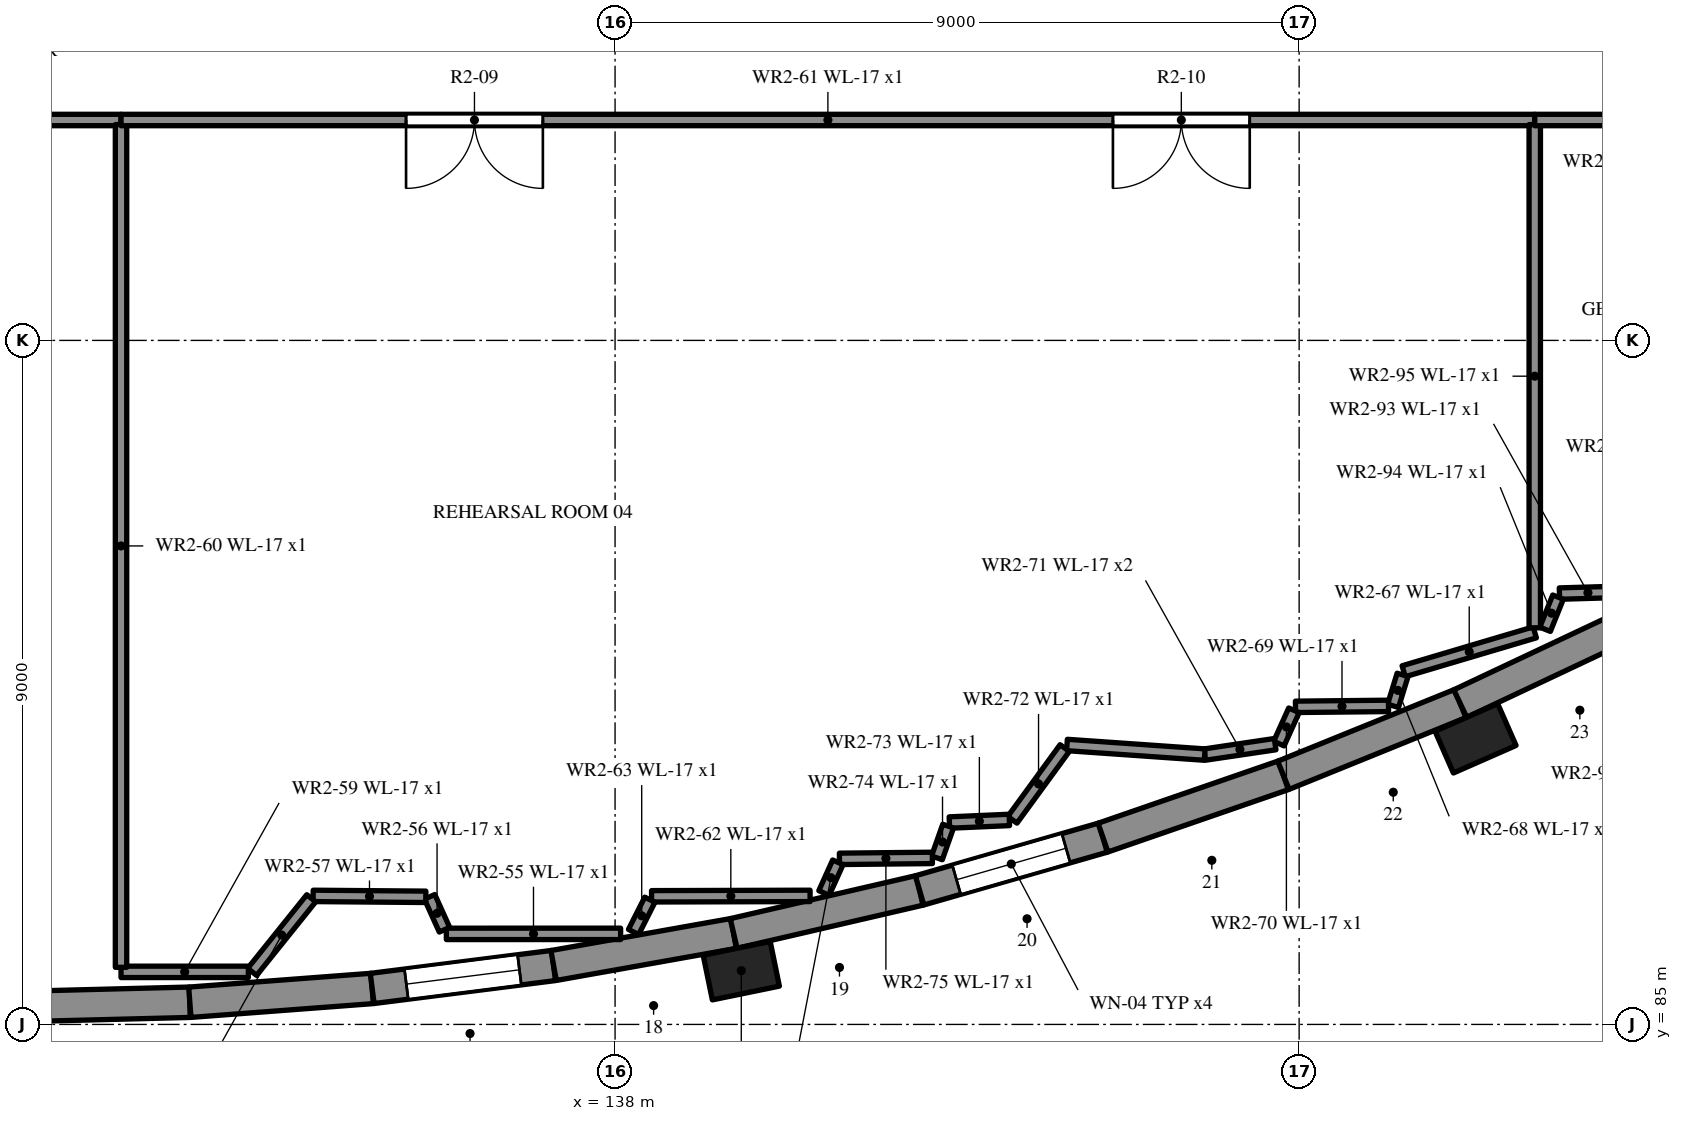
"""IFC4 building model, lengths in metres.
Left out: names, types, materials, properties, quantities, classifications, styles, units other than length and angle.
Written with IfcOpenShell. Run it as: python <this file> out.ifc"""

import sys

from ifc_helpers import new_model, si_unit, direction, frame, frame_2d, origin, origin_2d, place, context, subcontext, project, spatial, polyline, rectangle, outline, extrude, element, fill, save


model = new_model("IFC4")
c1 = context("Model", 3, precision=1e-05, world=origin(), true_north=direction((0.0, 1.0)))
c2 = subcontext(c1, "Body", "Model", "MODEL_VIEW")
j1 = project(units=[si_unit("LENGTHUNIT", "METRE"), si_unit("PLANEANGLEUNIT", "RADIAN")], contexts=[c1])
p1 = place(None, origin())
s1 = spatial("IfcSite", under=j1, at=p1, CompositionType="ELEMENT")
p2 = place(p1, origin())
s2 = spatial("IfcBuilding", under=s1, at=p2, CompositionType="ELEMENT")
p3 = place(p2, frame((0.0, 0.0, 10.2)))
s3 = spatial("IfcBuildingStorey", under=s2, at=p3, CompositionType="ELEMENT", Elevation=10.2)
p4 = place(p3, frame((130.0, 85.231, 0.0), z_axis=(0.0, 0.0, 1.0), x_axis=(0.999683321759, 0.025164582196, 0.0)))
e1 = element("IfcWall", 1, at=p4, inside=s3, PredefinedType="SOLIDWALL", context=c2, shape_type="SweptSolid", body=[
    extrude(outline(polyline([(0.0, 0.0), (2.406, 0.0), (2.406, 2.959), (2.373, 2.971), (0.063, 3.835), (0.0, 3.859), (0.0, 0.0)])), frame((0.0, 0.2, 0.0), z_axis=(0.0, -1.0, 0.0), x_axis=(1.0, 0.0, 0.0)), (0.0, 0.0, 1.0), 0.4),
])
p5 = place(p3, frame((132.405, 85.292, 0.0), z_axis=(0.0, 0.0, 1.0), x_axis=(0.997146276918, 0.075493724435, 0.0)))
e2 = element("IfcWall", 2, at=p5, inside=s3, PredefinedType="SOLIDWALL", context=c2, shape_type="SweptSolid", body=[
    extrude(outline(polyline([(0.0, 0.0), (2.406, 0.0), (2.406, 2.054), (2.345, 2.077), (0.0, 2.955), (0.0, 0.0)])), frame((0.0, 0.2, 0.0), z_axis=(0.0, -1.0, 0.0), x_axis=(1.0, 0.0, 0.0)), (0.0, 0.0, 1.0), 0.4),
])
p6 = place(p3, frame((134.804, 85.473, 0.0), z_axis=(0.0, 0.0, 1.0), x_axis=(0.99208939311, 0.125533406227, 0.0)))
e3 = element("IfcWall", 3, at=p6, inside=s3, PredefinedType="SOLIDWALL", context=c2, shape_type="SweptSolid", body=[
    extrude(outline(polyline([(0.0, 0.0), (2.406, 0.0), (2.406, 2.955), (2.34, 2.931), (0.108, 2.096), (0.0, 2.056), (0.0, 0.0)])), frame((0.0, 0.2, 0.0), z_axis=(0.0, -1.0, 0.0), x_axis=(1.0, 0.0, 0.0)), (0.0, 0.0, 1.0), 0.4),
])
p7 = place(p6, frame((0.453, 0.0, 0.9)))
e4 = element("IfcOpeningElement", 4, at=p7, cuts=e3, PredefinedType="OPENING", context=c2, shape_type="SweptSolid", body=[
    extrude(rectangle(XDim=1.5, YDim=0.9, at=frame_2d((0.75, 0.45))), frame((0.0, 0.21, 0.0), z_axis=(0.0, -1.0, 0.0), x_axis=(1.0, 0.0, 0.0)), (0.0, 0.0, 1.0), 0.42),
])
p8 = place(p3, frame((137.191, 85.775, 0.0), z_axis=(0.0, 0.0, 1.0), x_axis=(0.984524011381, 0.175249738987, 0.0)))
e5 = element("IfcWall", 5, at=p8, inside=s3, PredefinedType="SOLIDWALL", context=c2, shape_type="SweptSolid", body=[
    extrude(outline(polyline([(0.0, 0.0), (2.406, 0.0), (2.406, 3.817), (2.356, 3.84), (2.285, 3.814), (0.078, 2.988), (0.0, 2.959), (0.0, 0.0)])), frame((0.0, 0.2, 0.0), z_axis=(0.0, -1.0, 0.0), x_axis=(1.0, 0.0, 0.0)), (0.0, 0.0, 1.0), 0.4),
])
p9 = place(p3, frame((139.56, 86.197, 0.0), z_axis=(0.0, 0.0, 1.0), x_axis=(0.974210649093, 0.225640446716, 0.0)))
e6 = element("IfcWall", 6, at=p9, inside=s3, PredefinedType="SOLIDWALL", context=c2, shape_type="SweptSolid", body=[
    extrude(outline(polyline([(0.0, 0.0), (2.511, 0.0), (2.511, 2.911), (0.086, 3.783), (0.0, 3.813), (0.0, 0.0)])), frame((0.0, 0.2, 0.0), z_axis=(0.0, -1.0, 0.0), x_axis=(1.0, 0.0, 0.0)), (0.0, 0.0, 1.0), 0.4),
])
p10 = place(p3, frame((142.006, 86.764, 0.0), z_axis=(0.0, 0.0, 1.0), x_axis=(0.961008605775, 0.276518461637, 0.0)))
e7 = element("IfcWall", 7, at=p10, inside=s3, PredefinedType="SOLIDWALL", context=c2, shape_type="SweptSolid", body=[
    extrude(outline(polyline([(0.0, 0.0), (2.511, 0.0), (2.511, 2.007), (2.479, 2.019), (0.0, 2.907), (0.0, 0.0)])), frame((0.0, 0.2, 0.0), z_axis=(0.0, -1.0, 0.0), x_axis=(1.0, 0.0, 0.0)), (0.0, 0.0, 1.0), 0.4),
])
p11 = place(p10, frame((0.506, 0.0, 0.9)))
e8 = element("IfcOpeningElement", 8, at=p11, cuts=e7, PredefinedType="OPENING", context=c2, shape_type="SweptSolid", body=[
    extrude(rectangle(XDim=1.5, YDim=0.9, at=frame_2d((0.75, 0.45))), frame((0.0, 0.21, 0.0), z_axis=(0.0, -1.0, 0.0), x_axis=(1.0, 0.0, 0.0)), (0.0, 0.0, 1.0), 0.42),
])
p12 = place(p3, frame((144.419, 87.458, 0.0), z_axis=(0.0, 0.0, 1.0), x_axis=(0.94514546406, 0.326649738659, 0.0)))
e9 = element("IfcWall", 9, at=p12, inside=s3, PredefinedType="SOLIDWALL", context=c2, shape_type="SweptSolid", body=[
    extrude(outline(polyline([(0.0, 0.0), (2.511, 0.0), (2.511, 2.892), (2.382, 2.852), (0.19, 2.066), (0.0, 2.004), (0.0, 0.0)])), frame((0.0, 0.2, 0.0), z_axis=(0.0, -1.0, 0.0), x_axis=(1.0, 0.0, 0.0)), (0.0, 0.0, 1.0), 0.4),
])
p13 = place(p3, frame((146.793, 88.278, 0.0), z_axis=(0.0, 0.0, 1.0), x_axis=(0.926722795862, 0.375745738007, 0.0)))
e10 = element("IfcWall", 10, at=p13, inside=s3, PredefinedType="SOLIDWALL", context=c2, shape_type="SweptSolid", body=[
    extrude(outline(polyline([(0.0, 0.0), (2.511, 0.0), (2.511, 3.696), (2.479, 3.708), (2.398, 3.755), (2.317, 3.726), (0.144, 2.947), (0.0, 2.896), (0.0, 0.0)])), frame((0.0, 0.2, 0.0), z_axis=(0.0, -1.0, 0.0), x_axis=(1.0, 0.0, 0.0)), (0.0, 0.0, 1.0), 0.4),
])
p14 = place(p3, frame((149.12, 89.222, 0.0), z_axis=(0.0, 0.0, 1.0), x_axis=(0.904527098751, 0.42641614372, 0.0)))
e11 = element("IfcWall", 11, at=p14, inside=s3, PredefinedType="SOLIDWALL", context=c2, shape_type="SweptSolid", body=[
    extrude(outline(polyline([(0.0, 0.0), (2.772, 0.0), (2.772, 2.787), (2.749, 2.796), (0.21, 3.624), (0.116, 3.655), (0.0, 3.692), (0.0, 0.0)])), frame((0.0, 0.2, 0.0), z_axis=(0.0, -1.0, 0.0), x_axis=(1.0, 0.0, 0.0)), (0.0, 0.0, 1.0), 0.4),
])
p15 = place(p3, frame((139.66, 85.707, 0.0), z_axis=(0.0, 0.0, 1.0), x_axis=(0.979575047818, 0.201078904144, 0.0)))
e12 = element("IfcColumn", 12, at=p15, inside=s3, PredefinedType="PILASTER", context=c2, shape_type="SweptSolid", body=[
    extrude(rectangle(XDim=0.9, YDim=0.6, at=origin_2d()), origin(), (0.0, 0.0, 1.0), 3.247),
])
p16 = place(p3, frame((149.321, 88.764, 0.0), z_axis=(0.0, 0.0, 1.0), x_axis=(0.915419314521, 0.402501526211, 0.0)))
e13 = element("IfcColumn", 13, at=p16, inside=s3, PredefinedType="PILASTER", context=c2, shape_type="SweptSolid", body=[
    extrude(rectangle(XDim=0.9, YDim=0.6, at=origin_2d()), origin(), (0.0, 0.0, 1.0), 2.91),
])
p17 = place(p3, frame((131.5, 96.9, 0.0), z_axis=(0.0, 0.0, 1.0), x_axis=(-1.0, 0.0, 0.0)))
e14 = element("IfcWall", 14, at=p17, inside=s3, PredefinedType="PARTITIONING", context=c2, shape_type="SweptSolid", body=[
    extrude(rectangle(XDim=21.6, YDim=0.15, at=frame_2d((10.8, 0.0))), origin(), (0.0, 0.0, 1.0), 2.5),
])
p18 = place(p3, frame((138.073, 86.192, 0.0), z_axis=(0.0, 0.0, 1.0), x_axis=(-0.99999999433, -0.000106484932, 0.0)))
e15 = element("IfcWall", 15, at=p18, inside=s3, PredefinedType="PARTITIONING", context=c2, shape_type="SweptSolid", body=[
    extrude(rectangle(XDim=2.293, YDim=0.15, at=frame_2d((1.146, 0.0))), origin(), (0.0, 0.0, 1.0), 2.5),
])
p19 = place(p3, frame((135.756, 86.246, 0.0), z_axis=(0.0, 0.0, 1.0), x_axis=(-0.411669446009, 0.911333236101, 0.0)))
e16 = element("IfcWall", 16, at=p19, inside=s3, PredefinedType="PARTITIONING", context=c2, shape_type="SweptSolid", body=[
    extrude(rectangle(XDim=0.474, YDim=0.15, at=frame_2d((0.237, 0.0))), origin(), (0.0, 0.0, 1.0), 2.5),
])
p20 = place(p3, frame((135.51, 86.679, 0.0), z_axis=(0.0, 0.0, 1.0), x_axis=(-0.999966098072, 0.008234239938, 0.0)))
e17 = element("IfcWall", 17, at=p20, inside=s3, PredefinedType="PARTITIONING", context=c2, shape_type="SweptSolid", body=[
    extrude(rectangle(XDim=1.482, YDim=0.15, at=frame_2d((0.741, 0.0))), origin(), (0.0, 0.0, 1.0), 2.5),
])
p21 = place(p3, frame((134.003, 86.66, 0.0), z_axis=(0.0, 0.0, 1.0), x_axis=(-0.626036892137, -0.779793440395, 0.0)))
e18 = element("IfcWall", 18, at=p21, inside=s3, PredefinedType="PARTITIONING", context=c2, shape_type="SweptSolid", body=[
    extrude(rectangle(XDim=1.242, YDim=0.15, at=frame_2d((0.621, 0.0))), origin(), (0.0, 0.0, 1.0), 2.5),
])
p22 = place(p3, frame((133.175, 85.692, 0.0), z_axis=(0.0, 0.0, 1.0), x_axis=(-1.0, 0.0, 0.0)))
e19 = element("IfcWall", 19, at=p22, inside=s3, PredefinedType="PARTITIONING", context=c2, shape_type="SweptSolid", body=[
    extrude(rectangle(XDim=1.675, YDim=0.15, at=frame_2d((0.838, 0.0))), origin(), (0.0, 0.0, 1.0), 2.5),
])
p23 = place(p3, frame((131.5, 96.84, 0.0), z_axis=(0.0, 0.0, 1.0), x_axis=(0.0, -1.0, 0.0)))
e20 = element("IfcWall", 20, at=p23, inside=s3, PredefinedType="PARTITIONING", context=c2, shape_type="SweptSolid", body=[
    extrude(rectangle(XDim=11.089, YDim=0.15, at=frame_2d((5.544, 0.0))), origin(), (0.0, 0.0, 1.0), 2.5),
])
p24 = place(p3, frame((150.1, 96.9, 0.0), z_axis=(0.0, 0.0, 1.0), x_axis=(-1.0, 0.0, 0.0)))
e21 = element("IfcWall", 21, at=p24, inside=s3, PredefinedType="PARTITIONING", context=c2, shape_type="SweptSolid", body=[
    extrude(rectangle(XDim=18.6, YDim=0.15, at=frame_2d((9.3, 0.0))), origin(), (0.0, 0.0, 1.0), 2.5),
])
p25 = place(p24, frame((13.05, 0.0, 0.0)))
e22 = element("IfcOpeningElement", 22, at=p25, cuts=e21, PredefinedType="OPENING", context=c2, shape_type="SweptSolid", body=[
    extrude(rectangle(XDim=1.8, YDim=2.1, at=frame_2d((0.9, 1.05))), frame((0.0, 0.085, 0.0), z_axis=(0.0, -1.0, 0.0), x_axis=(1.0, 0.0, 0.0)), (0.0, 0.0, 1.0), 0.17),
])
p26 = place(p24, frame((3.75, 0.0, 0.0)))
e23 = element("IfcOpeningElement", 23, at=p26, cuts=e21, PredefinedType="OPENING", context=c2, shape_type="SweptSolid", body=[
    extrude(rectangle(XDim=1.8, YDim=2.1, at=frame_2d((0.9, 1.05))), frame((0.0, 0.085, 0.0), z_axis=(0.0, -1.0, 0.0), x_axis=(1.0, 0.0, 0.0)), (0.0, 0.0, 1.0), 0.17),
])
p27 = place(p3, frame((140.566, 86.691, 0.0), z_axis=(0.0, 0.0, 1.0), x_axis=(-0.999996683393, -0.002575500706, 0.0)))
e24 = element("IfcWall", 24, at=p27, inside=s3, PredefinedType="PARTITIONING", context=c2, shape_type="SweptSolid", body=[
    extrude(rectangle(XDim=2.085, YDim=0.15, at=frame_2d((1.043, 0.0))), origin(), (0.0, 0.0, 1.0), 2.5),
])
p28 = place(p3, frame((138.458, 86.641, 0.0), z_axis=(0.0, 0.0, 1.0), x_axis=(-0.45070081115, -0.892675069008, 0.0)))
e25 = element("IfcWall", 25, at=p28, inside=s3, PredefinedType="PARTITIONING", context=c2, shape_type="SweptSolid", body=[
    extrude(rectangle(XDim=0.476, YDim=0.15, at=frame_2d((0.238, 0.0))), origin(), (0.0, 0.0, 1.0), 2.5),
])
p29 = place(p3, frame((150.1, 90.158, 0.0), z_axis=(0.0, 0.0, 1.0), x_axis=(-0.958762505139, -0.284208477599, 0.0)))
e26 = element("IfcWall", 26, at=p29, inside=s3, PredefinedType="PARTITIONING", context=c2, shape_type="SweptSolid", body=[
    extrude(rectangle(XDim=1.799, YDim=0.15, at=frame_2d((0.899, 0.0))), origin(), (0.0, 0.0, 1.0), 2.5),
])
p30 = place(p3, frame((148.361, 89.599, 0.0), z_axis=(0.0, 0.0, 1.0), x_axis=(-0.293804120927, -0.955865648785, 0.0)))
e27 = element("IfcWall", 27, at=p30, inside=s3, PredefinedType="PARTITIONING", context=c2, shape_type="SweptSolid", body=[
    extrude(rectangle(XDim=0.426, YDim=0.15, at=frame_2d((0.213, 0.0))), origin(), (0.0, 0.0, 1.0), 2.5),
])
p31 = place(p3, frame((148.176, 89.191, 0.0), z_axis=(0.0, 0.0, 1.0), x_axis=(-0.99994825347, -0.010173022327, 0.0)))
e28 = element("IfcWall", 28, at=p31, inside=s3, PredefinedType="PARTITIONING", context=c2, shape_type="SweptSolid", body=[
    extrude(rectangle(XDim=1.224, YDim=0.15, at=frame_2d((0.612, 0.0))), origin(), (0.0, 0.0, 1.0), 2.5),
])
p32 = place(p3, frame((146.931, 89.133, 0.0), z_axis=(0.0, 0.0, 1.0), x_axis=(-0.411926919876, -0.911216885643, 0.0)))
e29 = element("IfcWall", 29, at=p32, inside=s3, PredefinedType="PARTITIONING", context=c2, shape_type="SweptSolid", body=[
    extrude(rectangle(XDim=0.481, YDim=0.15, at=frame_2d((0.24, 0.0))), origin(), (0.0, 0.0, 1.0), 2.5),
])
p33 = place(p3, frame((146.684, 88.688, 0.0), z_axis=(0.0, 0.0, 1.0), x_axis=(-0.989174053521, -0.1467470335, 0.0)))
e30 = element("IfcWall", 30, at=p33, inside=s3, PredefinedType="PARTITIONING", context=c2, shape_type="SweptSolid", body=[
    extrude(rectangle(XDim=0.937, YDim=0.15, at=frame_2d((0.468, 0.0))), origin(), (0.0, 0.0, 1.0), 2.5),
])
p34 = place(p3, frame((145.758, 88.55, 0.0), z_axis=(0.0, 0.0, 1.0), x_axis=(-0.997564674207, 0.069747550305, 0.0)))
e31 = element("IfcWall", 31, at=p34, inside=s3, PredefinedType="PARTITIONING", context=c2, shape_type="SweptSolid", body=[
    extrude(rectangle(XDim=1.817, YDim=0.15, at=frame_2d((0.908, 0.0))), origin(), (0.0, 0.0, 1.0), 2.5),
])
p35 = place(p3, frame((143.916, 88.636, 0.0), z_axis=(0.0, 0.0, 1.0), x_axis=(-0.589351162838, -0.807876975078, 0.0)))
e32 = element("IfcWall", 32, at=p35, inside=s3, PredefinedType="PARTITIONING", context=c2, shape_type="SweptSolid", body=[
    extrude(rectangle(XDim=1.169, YDim=0.15, at=frame_2d((0.584, 0.0))), origin(), (0.0, 0.0, 1.0), 2.5),
])
p36 = place(p3, frame((143.187, 87.691, 0.0), z_axis=(0.0, 0.0, 1.0), x_axis=(-0.99904855644, -0.04361171717, 0.0)))
e33 = element("IfcWall", 33, at=p36, inside=s3, PredefinedType="PARTITIONING", context=c2, shape_type="SweptSolid", body=[
    extrude(rectangle(XDim=0.789, YDim=0.15, at=frame_2d((0.395, 0.0))), origin(), (0.0, 0.0, 1.0), 2.5),
])
p37 = place(p3, frame((142.382, 87.609, 0.0), z_axis=(0.0, 0.0, 1.0), x_axis=(-0.333224098067, -0.942847654962, 0.0)))
e34 = element("IfcWall", 34, at=p37, inside=s3, PredefinedType="PARTITIONING", context=c2, shape_type="SweptSolid", body=[
    extrude(rectangle(XDim=0.443, YDim=0.15, at=frame_2d((0.221, 0.0))), origin(), (0.0, 0.0, 1.0), 2.5),
])
p38 = place(p3, frame((142.174, 87.191, 0.0), z_axis=(0.0, 0.0, 1.0), x_axis=(-0.999948129387, -0.010185211623, 0.0)))
e35 = element("IfcWall", 35, at=p38, inside=s3, PredefinedType="PARTITIONING", context=c2, shape_type="SweptSolid", body=[
    extrude(rectangle(XDim=1.222, YDim=0.15, at=frame_2d((0.611, 0.0))), origin(), (0.0, 0.0, 1.0), 2.5),
])
p39 = place(p3, frame((140.931, 87.133, 0.0), z_axis=(0.0, 0.0, 1.0), x_axis=(-0.41185225152, -0.911250636718, 0.0)))
e36 = element("IfcWall", 36, at=p39, inside=s3, PredefinedType="PARTITIONING", context=c2, shape_type="SweptSolid", body=[
    extrude(rectangle(XDim=0.443, YDim=0.15, at=frame_2d((0.222, 0.0))), origin(), (0.0, 0.0, 1.0), 2.5),
])
p40 = place(p3, frame((151.175, 90.691, 0.0), z_axis=(0.0, 0.0, 1.0), x_axis=(-0.999580594318, -0.028959203416, 0.0)))
e37 = element("IfcWall", 37, at=p40, inside=s3, PredefinedType="PARTITIONING", context=c2, shape_type="SweptSolid", body=[
    extrude(rectangle(XDim=0.75, YDim=0.15, at=frame_2d((0.375, 0.0))), origin(), (0.0, 0.0, 1.0), 2.5),
])
p41 = place(p3, frame((150.406, 90.623, 0.0), z_axis=(0.0, 0.0, 1.0), x_axis=(-0.372588519489, -0.927996656861, 0.0)))
e38 = element("IfcWall", 38, at=p41, inside=s3, PredefinedType="PARTITIONING", context=c2, shape_type="SweptSolid", body=[
    extrude(rectangle(XDim=0.457, YDim=0.15, at=frame_2d((0.229, 0.0))), origin(), (0.0, 0.0, 1.0), 2.5),
])
p42 = place(p3, frame((150.1, 90.219, 0.0), z_axis=(0.0, 0.0, 1.0), x_axis=(0.0, 1.0, 0.0)))
e39 = element("IfcWall", 39, at=p42, inside=s3, PredefinedType="PARTITIONING", context=c2, shape_type="SweptSolid", body=[
    extrude(rectangle(XDim=6.622, YDim=0.15, at=frame_2d((3.311, 0.0))), origin(), (0.0, 0.0, 1.0), 2.5),
])
p43 = place(p3, frame((152.833, 96.9, 0.0), z_axis=(0.0, 0.0, 1.0), x_axis=(-1.0, 0.0, 0.0)))
e40 = element("IfcWall", 40, at=p43, inside=s3, PredefinedType="PARTITIONING", context=c2, shape_type="SweptSolid", body=[
    extrude(rectangle(XDim=2.733, YDim=0.15, at=frame_2d((1.367, 0.0))), origin(), (0.0, 0.0, 1.0), 2.5),
])
p44 = place(p43, frame((0.917, 0.0, 0.0)))
e41 = element("IfcOpeningElement", 41, at=p44, cuts=e40, PredefinedType="OPENING", context=c2, shape_type="SweptSolid", body=[
    extrude(rectangle(XDim=0.9, YDim=2.1, at=frame_2d((0.45, 1.05))), frame((0.0, 0.085, 0.0), z_axis=(0.0, -1.0, 0.0), x_axis=(1.0, 0.0, 0.0)), (0.0, 0.0, 1.0), 0.17),
])
p45 = place(p7, origin())
e42 = element("IfcWindow", 42, at=p45, inside=s3, PartitioningType="SINGLE_PANEL", PredefinedType="WINDOW", context=c2, shape_type="SweptSolid", body=[
    extrude(rectangle(XDim=1.5, YDim=0.9, at=frame_2d((0.75, 0.45))), frame((0.0, 0.03, 0.0), z_axis=(0.0, -1.0, 0.0), x_axis=(1.0, 0.0, 0.0)), (0.0, 0.0, 1.0), 0.06),
])
fill(e4, e42)
p46 = place(p11, origin())
e43 = element("IfcWindow", 43, at=p46, inside=s3, PartitioningType="SINGLE_PANEL", PredefinedType="WINDOW", context=c2, shape_type="SweptSolid", body=[
    extrude(rectangle(XDim=1.5, YDim=0.9, at=frame_2d((0.75, 0.45))), frame((0.0, 0.03, 0.0), z_axis=(0.0, -1.0, 0.0), x_axis=(1.0, 0.0, 0.0)), (0.0, 0.0, 1.0), 0.06),
])
fill(e8, e43)
p47 = place(p25, origin())
e44 = element("IfcDoor", 44, at=p47, inside=s3, OperationType="DOUBLE_DOOR_SINGLE_SWING", PredefinedType="DOOR", context=c2, shape_type="SweptSolid", body=[
    extrude(rectangle(XDim=1.8, YDim=2.1, at=frame_2d((0.9, 1.05))), frame((0.0, 0.025, 0.0), z_axis=(0.0, -1.0, 0.0), x_axis=(1.0, 0.0, 0.0)), (0.0, 0.0, 1.0), 0.05),
])
fill(e22, e44)
p48 = place(p26, origin())
e45 = element("IfcDoor", 45, at=p48, inside=s3, OperationType="DOUBLE_DOOR_SINGLE_SWING", PredefinedType="DOOR", context=c2, shape_type="SweptSolid", body=[
    extrude(rectangle(XDim=1.8, YDim=2.1, at=frame_2d((0.9, 1.05))), frame((0.0, 0.025, 0.0), z_axis=(0.0, -1.0, 0.0), x_axis=(1.0, 0.0, 0.0)), (0.0, 0.0, 1.0), 0.05),
])
fill(e23, e45)
save(model, sys.argv[1])
